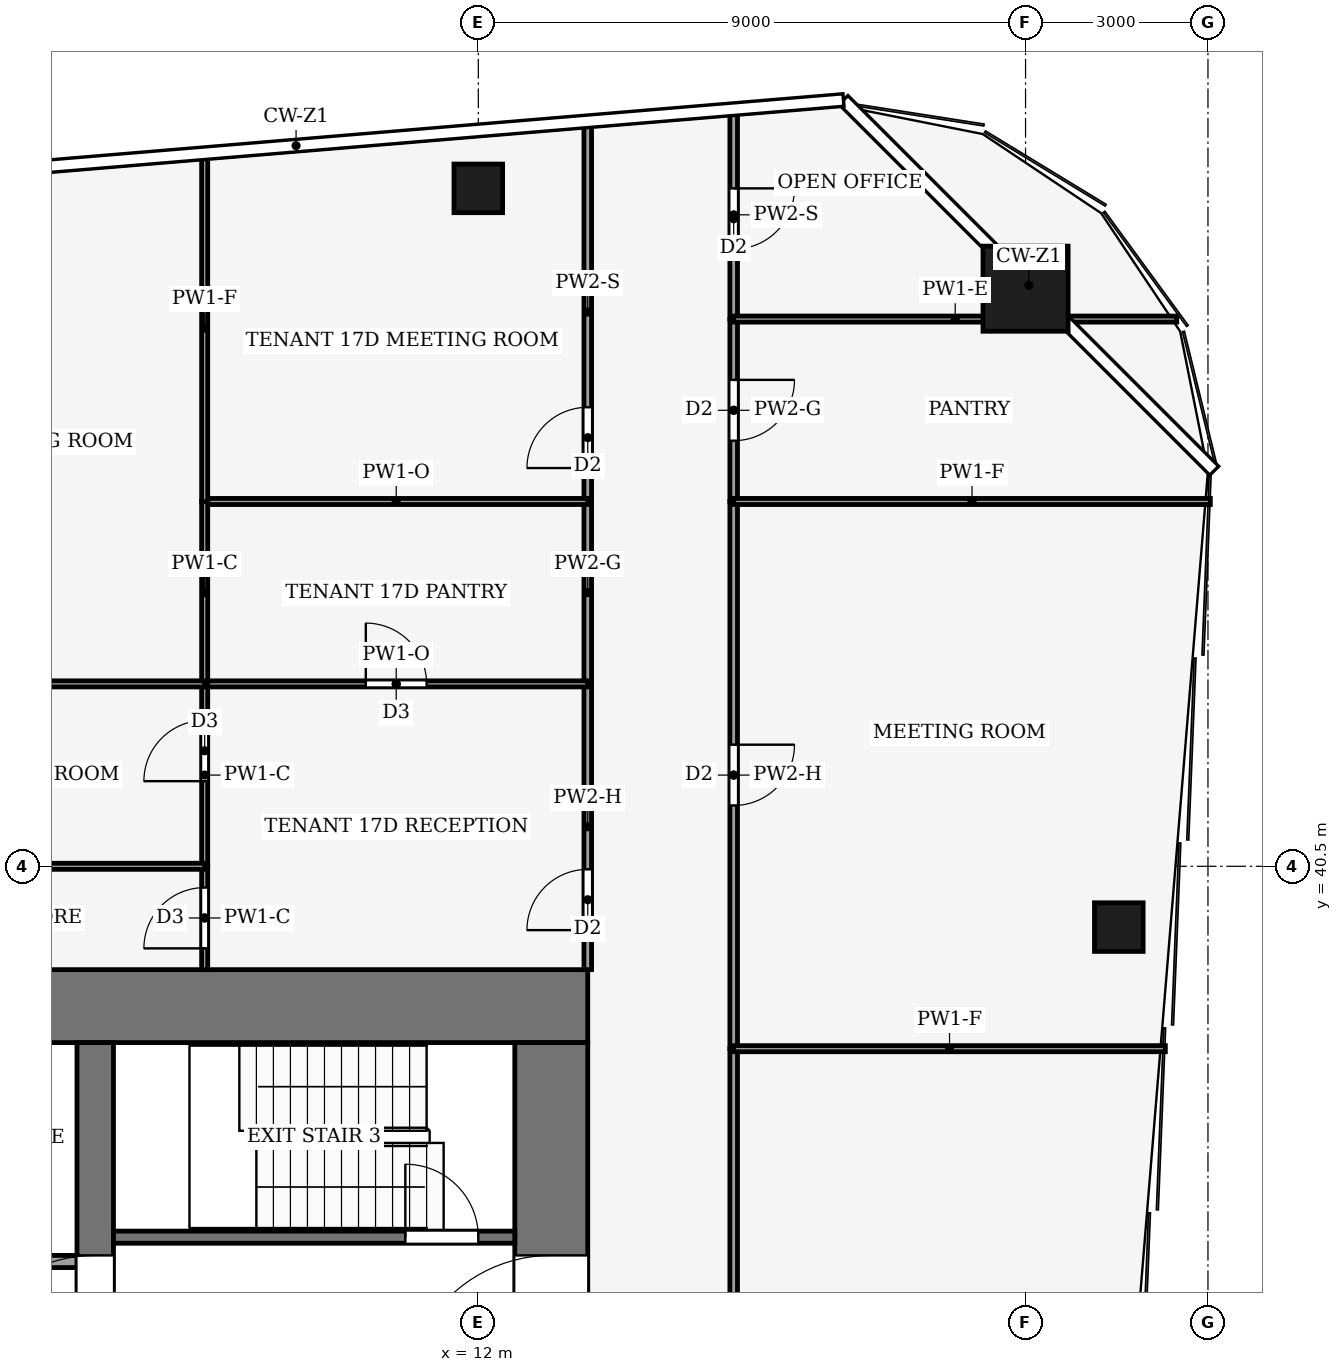
"""IFC4 building model, lengths in metres.
Left out: names, types, materials, properties, quantities, classifications, styles, units other than length and angle.
Written with IfcOpenShell. Run it as: python <this file> out.ifc"""

import sys

from ifc_helpers import new_model, si_unit, direction, frame, frame_2d, origin, origin_2d, place, context, subcontext, project, spatial, rectangle, hollow_rectangle, extrude, element, fill, save


model = new_model("IFC4")
c1 = context("Model", 3, precision=1e-05, world=origin(), true_north=direction((0.0, 1.0)))
c2 = subcontext(c1, "Body", "Model", "MODEL_VIEW")
j1 = project(units=[si_unit("LENGTHUNIT", "METRE"), si_unit("PLANEANGLEUNIT", "RADIAN")], contexts=[c1])
p1 = place(None, origin())
s1 = spatial("IfcSite", under=j1, at=p1, CompositionType="ELEMENT")
p2 = place(p1, origin())
s2 = spatial("IfcBuilding", under=s1, at=p2, CompositionType="ELEMENT")
p3 = place(p2, frame((0.0, 0.0, 78.0)))
s3 = spatial("IfcBuildingStorey", under=s2, at=p3, CompositionType="ELEMENT", Elevation=78.0)
p4 = place(p3, frame((-13.8, 38.2, -0.13), z_axis=(0.0, 0.0, 1.0), x_axis=(1.0, 0.0, 0.0)))
e1 = element("IfcWall", 1, at=p4, inside=s3, PredefinedType="SHEAR", context=c2, shape_type="SweptSolid", body=[
    extrude(rectangle(XDim=27.6, YDim=1.2, at=frame_2d((13.8, 0.0))), origin(), (0.0, 0.0, 1.0), 4.0),
])
p5 = place(p3, frame((13.2, 18.4, -0.13), z_axis=(0.0, 0.0, 1.0), x_axis=(0.0, 1.0, 0.0)))
e2 = element("IfcWall", 2, at=p5, inside=s3, PredefinedType="SHEAR", context=c2, shape_type="SweptSolid", body=[
    extrude(rectangle(XDim=19.2, YDim=1.2, at=frame_2d((9.6, 0.0))), origin(), (0.0, 0.0, 1.0), 4.0),
])
p6 = place(p5, frame((2.8, 0.0, 0.13)))
e3 = element("IfcOpeningElement", 3, at=p6, cuts=e2, PredefinedType="OPENING", context=c2, shape_type="SweptSolid", body=[
    extrude(rectangle(XDim=2.4, YDim=2.4, at=frame_2d((1.2, 1.2))), frame((0.0, 0.61, 0.0), z_axis=(0.0, -1.0, 0.0), x_axis=(1.0, 0.0, 0.0)), (0.0, 0.0, 1.0), 1.22),
])
p7 = place(p5, frame((13.3, 0.0, 0.13)))
e4 = element("IfcOpeningElement", 4, at=p7, cuts=e2, PredefinedType="OPENING", context=c2, shape_type="SweptSolid", body=[
    extrude(rectangle(XDim=2.4, YDim=2.4, at=frame_2d((1.2, 1.2))), frame((0.0, 0.61, 0.0), z_axis=(0.0, -1.0, 0.0), x_axis=(1.0, 0.0, 0.0)), (0.0, 0.0, 1.0), 1.22),
])
p8 = place(p3, frame((5.7, 18.4, -0.13), z_axis=(0.0, 0.0, 1.0), x_axis=(0.0, 1.0, 0.0)))
e5 = element("IfcWall", 5, at=p8, inside=s3, PredefinedType="SHEAR", context=c2, shape_type="SweptSolid", body=[
    extrude(rectangle(XDim=19.2, YDim=0.6, at=frame_2d((9.6, 0.0))), origin(), (0.0, 0.0, 1.0), 4.0),
])
p9 = place(p8, frame((8.35, 0.0, 0.13)))
e6 = element("IfcOpeningElement", 6, at=p9, cuts=e5, PredefinedType="OPENING", context=c2, shape_type="SweptSolid", body=[
    extrude(rectangle(XDim=0.9, YDim=2.1, at=frame_2d((0.45, 1.05))), frame((0.0, 0.31, 0.0), z_axis=(0.0, -1.0, 0.0), x_axis=(1.0, 0.0, 0.0)), (0.0, 0.0, 1.0), 0.62),
])
p10 = place(p8, frame((13.3, 0.0, 0.13)))
e7 = element("IfcOpeningElement", 7, at=p10, cuts=e5, PredefinedType="OPENING", context=c2, shape_type="SweptSolid", body=[
    extrude(rectangle(XDim=2.4, YDim=2.4, at=frame_2d((1.2, 1.2))), frame((0.0, 0.31, 0.0), z_axis=(0.0, -1.0, 0.0), x_axis=(1.0, 0.0, 0.0)), (0.0, 0.0, 1.0), 0.62),
])
p11 = place(p3, frame((21.0, 50.0, 0.0), z_axis=(0.0, 0.0, 1.0), x_axis=(1.0, 0.0, 0.0)))
e8 = element("IfcColumn", 8, at=p11, inside=s3, PredefinedType="COLUMN", context=c2, shape_type="SweptSolid", body=[
    extrude(hollow_rectangle(XDim=1.4, YDim=1.4, WallThickness=0.08, at=origin_2d()), origin(), (0.0, 0.0, 1.0), 4.0),
])
for number, where, z_axis, x_axis in (
    (9, (12.0, 51.65, 0.0), (0.0, 0.0, 1.0), (1.0, 0.0, 0.0)),
    (10, (22.534, 39.5, 0.0), (0.0, 0.0, 1.0), (1.0, 0.0, 0.0)),
):
    element("IfcColumn", number, at=place(p3, frame(where, z_axis=z_axis, x_axis=x_axis)), inside=s3, PredefinedType="COLUMN", context=c2, shape_type="SweptSolid", body=[
        extrude(hollow_rectangle(XDim=0.8, YDim=0.8, WallThickness=0.04, at=origin_2d()), origin(), (0.0, 0.0, 1.0), 4.0),
    ])
p12 = place(p3, frame((-5.4, 34.0, 0.0), z_axis=(0.0, 0.0, 1.0), x_axis=(1.0, 0.0, 0.0)))
e11 = element("IfcWall", 11, at=p12, inside=s3, PredefinedType="PARTITIONING", context=c2, shape_type="SweptSolid", body=[
    extrude(rectangle(XDim=10.8, YDim=0.2, at=frame_2d((5.4, 0.0))), origin(), (0.0, 0.0, 1.0), 3.87),
])
p13 = place(p12, frame((6.15, 0.0, 0.0)))
e12 = element("IfcOpeningElement", 12, at=p13, cuts=e11, PredefinedType="OPENING", context=c2, shape_type="SweptSolid", body=[
    extrude(rectangle(XDim=1.2, YDim=2.2, at=frame_2d((0.6, 1.1))), frame((0.0, 0.11, 0.0), z_axis=(0.0, -1.0, 0.0), x_axis=(1.0, 0.0, 0.0)), (0.0, 0.0, 1.0), 0.22),
])
p14 = place(p12, frame((8.95, 0.0, 0.0)))
e13 = element("IfcOpeningElement", 13, at=p14, cuts=e11, PredefinedType="OPENING", context=c2, shape_type="SweptSolid", body=[
    extrude(rectangle(XDim=1.0, YDim=2.1, at=frame_2d((0.5, 1.05))), frame((0.0, 0.11, 0.0), z_axis=(0.0, -1.0, 0.0), x_axis=(1.0, 0.0, 0.0)), (0.0, 0.0, 1.0), 0.22),
])
p15 = place(p3, frame((6.0, 34.4, 0.0), z_axis=(0.0, 0.0, 1.0), x_axis=(1.0, 0.0, 0.0)))
e14 = element("IfcWall", 14, at=p15, inside=s3, PredefinedType="PARTITIONING", context=c2, shape_type="SweptSolid", body=[
    extrude(rectangle(XDim=6.6, YDim=0.2, at=frame_2d((3.3, 0.0))), origin(), (0.0, 0.0, 1.0), 3.87),
])
p16 = place(p15, frame((4.8, 0.0, 0.0)))
e15 = element("IfcOpeningElement", 15, at=p16, cuts=e14, PredefinedType="OPENING", context=c2, shape_type="SweptSolid", body=[
    extrude(rectangle(XDim=1.2, YDim=2.2, at=frame_2d((0.6, 1.1))), frame((0.0, 0.11, 0.0), z_axis=(0.0, -1.0, 0.0), x_axis=(1.0, 0.0, 0.0)), (0.0, 0.0, 1.0), 0.22),
])
p17 = place(p3, frame((16.2, 37.5, 0.0), z_axis=(0.0, 0.0, 1.0), x_axis=(0.0, -1.0, 0.0)))
e16 = element("IfcWall", 16, at=p17, inside=s3, PredefinedType="PARTITIONING", context=c2, shape_type="SweptSolid", body=[
    extrude(rectangle(XDim=12.0, YDim=0.125, at=frame_2d((6.0, 0.0))), origin(), (0.0, 0.0, 1.0), 3.48),
])
p18 = place(p17, frame((5.5, 0.0, 0.0)))
e17 = element("IfcOpeningElement", 17, at=p18, cuts=e16, PredefinedType="OPENING", context=c2, shape_type="SweptSolid", body=[
    extrude(rectangle(XDim=1.0, YDim=2.1, at=frame_2d((0.5, 1.05))), frame((0.0, 0.073, 0.0), z_axis=(0.0, -1.0, 0.0), x_axis=(1.0, 0.0, 0.0)), (0.0, 0.0, 1.0), 0.145),
])
p19 = place(p3, frame((16.2, 46.5, 0.0), z_axis=(0.0, 0.0, 1.0), x_axis=(0.0, -1.0, 0.0)))
e18 = element("IfcWall", 18, at=p19, inside=s3, PredefinedType="PARTITIONING", context=c2, shape_type="SweptSolid", body=[
    extrude(rectangle(XDim=9.0, YDim=0.125, at=frame_2d((4.5, 0.0))), origin(), (0.0, 0.0, 1.0), 3.14),
])
p20 = place(p19, frame((4.0, 0.0, 0.0)))
e19 = element("IfcOpeningElement", 19, at=p20, cuts=e18, PredefinedType="OPENING", context=c2, shape_type="SweptSolid", body=[
    extrude(rectangle(XDim=1.0, YDim=2.1, at=frame_2d((0.5, 1.05))), frame((0.0, 0.073, 0.0), z_axis=(0.0, -1.0, 0.0), x_axis=(1.0, 0.0, 0.0)), (0.0, 0.0, 1.0), 0.145),
])
p21 = place(p3, frame((16.2, 49.5, 0.0), z_axis=(0.0, 0.0, 1.0), x_axis=(0.0, -1.0, 0.0)))
e20 = element("IfcWall", 20, at=p21, inside=s3, PredefinedType="PARTITIONING", context=c2, shape_type="SweptSolid", body=[
    extrude(rectangle(XDim=3.0, YDim=0.125, at=frame_2d((1.5, 0.0))), origin(), (0.0, 0.0, 1.0), 3.87),
])
p22 = place(p21, frame((1.0, 0.0, 0.0)))
e21 = element("IfcOpeningElement", 21, at=p22, cuts=e20, PredefinedType="OPENING", context=c2, shape_type="SweptSolid", body=[
    extrude(rectangle(XDim=1.0, YDim=2.1, at=frame_2d((0.5, 1.05))), frame((0.0, 0.073, 0.0), z_axis=(0.0, -1.0, 0.0), x_axis=(1.0, 0.0, 0.0)), (0.0, 0.0, 1.0), 0.145),
])
p23 = place(p3, frame((16.2, 52.93, 0.0), z_axis=(0.0, 0.0, 1.0), x_axis=(0.0, -1.0, 0.0)))
e22 = element("IfcWall", 22, at=p23, inside=s3, PredefinedType="PARTITIONING", context=c2, shape_type="SweptSolid", body=[
    extrude(rectangle(XDim=3.43, YDim=0.125, at=frame_2d((1.715, 0.0))), origin(), (0.0, 0.0, 1.0), 3.04),
])
p24 = place(p23, frame((1.28, 0.0, 0.0)))
e23 = element("IfcOpeningElement", 23, at=p24, cuts=e22, PredefinedType="OPENING", context=c2, shape_type="SweptSolid", body=[
    extrude(rectangle(XDim=1.0, YDim=2.1, at=frame_2d((0.5, 1.05))), frame((0.0, 0.073, 0.0), z_axis=(0.0, -1.0, 0.0), x_axis=(1.0, 0.0, 0.0)), (0.0, 0.0, 1.0), 0.145),
])
p25 = place(p3, frame((13.8, 38.8, 0.0), z_axis=(0.0, 0.0, 1.0), x_axis=(0.0, 1.0, 0.0)))
e24 = element("IfcWall", 24, at=p25, inside=s3, PredefinedType="PARTITIONING", context=c2, shape_type="SweptSolid", body=[
    extrude(rectangle(XDim=4.7, YDim=0.125, at=frame_2d((2.35, 0.0))), origin(), (0.0, 0.0, 1.0), 3.14),
])
p26 = place(p25, frame((0.65, 0.0, 0.0)))
e25 = element("IfcOpeningElement", 25, at=p26, cuts=e24, PredefinedType="OPENING", context=c2, shape_type="SweptSolid", body=[
    extrude(rectangle(XDim=1.0, YDim=2.1, at=frame_2d((0.5, 1.05))), frame((0.0, 0.073, 0.0), z_axis=(0.0, -1.0, 0.0), x_axis=(1.0, 0.0, 0.0)), (0.0, 0.0, 1.0), 0.145),
])
p27 = place(p3, frame((13.8, 46.5, 0.0), z_axis=(0.0, 0.0, 1.0), x_axis=(0.0, -1.0, 0.0)))
e26 = element("IfcWall", 26, at=p27, inside=s3, PredefinedType="PARTITIONING", context=c2, shape_type="SweptSolid", body=[
    extrude(rectangle(XDim=3.0, YDim=0.125, at=frame_2d((1.5, 0.0))), origin(), (0.0, 0.0, 1.0), 3.87),
])
p28 = place(p3, frame((13.8, 46.5, 0.0), z_axis=(0.0, 0.0, 1.0), x_axis=(0.0, 1.0, 0.0)))
e27 = element("IfcWall", 27, at=p28, inside=s3, PredefinedType="PARTITIONING", context=c2, shape_type="SweptSolid", body=[
    extrude(rectangle(XDim=6.23, YDim=0.125, at=frame_2d((3.115, 0.0))), origin(), (0.0, 0.0, 1.0), 3.04),
])
p29 = place(p28, frame((0.55, 0.0, 0.0)))
e28 = element("IfcOpeningElement", 28, at=p29, cuts=e27, PredefinedType="OPENING", context=c2, shape_type="SweptSolid", body=[
    extrude(rectangle(XDim=1.0, YDim=2.1, at=frame_2d((0.5, 1.05))), frame((0.0, 0.073, 0.0), z_axis=(0.0, -1.0, 0.0), x_axis=(1.0, 0.0, 0.0)), (0.0, 0.0, 1.0), 0.145),
])
p30 = place(p3, frame((23.299, 37.5, 0.0), z_axis=(0.0, 0.0, 1.0), x_axis=(-1.0, 0.0, 0.0)))
e29 = element("IfcWall", 29, at=p30, inside=s3, PredefinedType="PARTITIONING", context=c2, shape_type="SweptSolid", body=[
    extrude(rectangle(XDim=7.099, YDim=0.1, at=frame_2d((3.55, 0.0))), origin(), (0.0, 0.0, 1.0), 3.04),
])
p31 = place(p3, frame((24.039, 46.5, 0.0), z_axis=(0.0, 0.0, 1.0), x_axis=(-1.0, 0.0, 0.0)))
e30 = element("IfcWall", 30, at=p31, inside=s3, PredefinedType="PARTITIONING", context=c2, shape_type="SweptSolid", body=[
    extrude(rectangle(XDim=7.839, YDim=0.1, at=frame_2d((3.919, 0.0))), origin(), (0.0, 0.0, 1.0), 3.04),
])
p32 = place(p3, frame((23.487, 49.5, 0.0), z_axis=(0.0, 0.0, 1.0), x_axis=(-1.0, 0.0, 0.0)))
e31 = element("IfcWall", 31, at=p32, inside=s3, PredefinedType="PARTITIONING", context=c2, shape_type="SweptSolid", body=[
    extrude(rectangle(XDim=7.287, YDim=0.1, at=frame_2d((3.644, 0.0))), origin(), (0.0, 0.0, 1.0), 3.34),
])
p33 = place(p3, frame((7.5, 43.5, 0.0), z_axis=(0.0, 0.0, 1.0), x_axis=(1.0, 0.0, 0.0)))
e32 = element("IfcWall", 32, at=p33, inside=s3, PredefinedType="PARTITIONING", context=c2, shape_type="SweptSolid", body=[
    extrude(rectangle(XDim=6.3, YDim=0.1, at=frame_2d((3.15, 0.0))), origin(), (0.0, 0.0, 1.0), 3.39),
])
p34 = place(p33, frame((2.65, 0.0, 0.0)))
e33 = element("IfcOpeningElement", 33, at=p34, cuts=e32, PredefinedType="OPENING", context=c2, shape_type="SweptSolid", body=[
    extrude(rectangle(XDim=1.0, YDim=2.1, at=frame_2d((0.5, 1.05))), frame((0.0, 0.06, 0.0), z_axis=(0.0, -1.0, 0.0), x_axis=(1.0, 0.0, 0.0)), (0.0, 0.0, 1.0), 0.12),
])
p35 = place(p3, frame((7.5, 38.8, 0.0), z_axis=(0.0, 0.0, 1.0), x_axis=(0.0, 1.0, 0.0)))
e34 = element("IfcWall", 34, at=p35, inside=s3, PredefinedType="PARTITIONING", context=c2, shape_type="SweptSolid", body=[
    extrude(rectangle(XDim=1.7, YDim=0.1, at=frame_2d((0.85, 0.0))), origin(), (0.0, 0.0, 1.0), 3.87),
])
p36 = place(p35, frame((0.35, 0.0, 0.0)))
e35 = element("IfcOpeningElement", 35, at=p36, cuts=e34, PredefinedType="OPENING", context=c2, shape_type="SweptSolid", body=[
    extrude(rectangle(XDim=1.0, YDim=2.1, at=frame_2d((0.5, 1.05))), frame((0.0, 0.06, 0.0), z_axis=(0.0, -1.0, 0.0), x_axis=(1.0, 0.0, 0.0)), (0.0, 0.0, 1.0), 0.12),
])
p37 = place(p3, frame((7.5, 40.5, 0.0), z_axis=(0.0, 0.0, 1.0), x_axis=(0.0, 1.0, 0.0)))
e36 = element("IfcWall", 36, at=p37, inside=s3, PredefinedType="PARTITIONING", context=c2, shape_type="SweptSolid", body=[
    extrude(rectangle(XDim=3.0, YDim=0.1, at=frame_2d((1.5, 0.0))), origin(), (0.0, 0.0, 1.0), 3.87),
])
p38 = place(p37, frame((1.4, 0.0, 0.0)))
e37 = element("IfcOpeningElement", 37, at=p38, cuts=e36, PredefinedType="OPENING", context=c2, shape_type="SweptSolid", body=[
    extrude(rectangle(XDim=1.0, YDim=2.1, at=frame_2d((0.5, 1.05))), frame((0.0, 0.06, 0.0), z_axis=(0.0, -1.0, 0.0), x_axis=(1.0, 0.0, 0.0)), (0.0, 0.0, 1.0), 0.12),
])
p39 = place(p3, frame((13.8, 46.5, 0.0), z_axis=(0.0, 0.0, 1.0), x_axis=(-1.0, 0.0, 0.0)))
e38 = element("IfcWall", 38, at=p39, inside=s3, PredefinedType="PARTITIONING", context=c2, shape_type="SweptSolid", body=[
    extrude(rectangle(XDim=6.3, YDim=0.1, at=frame_2d((3.15, 0.0))), origin(), (0.0, 0.0, 1.0), 3.39),
])
p40 = place(p3, frame((7.5, 46.504, 0.0), z_axis=(0.0, 0.0, 1.0), x_axis=(0.0, -1.0, 0.0)))
e39 = element("IfcWall", 39, at=p40, inside=s3, PredefinedType="PARTITIONING", context=c2, shape_type="SweptSolid", body=[
    extrude(rectangle(XDim=3.004, YDim=0.1, at=frame_2d((1.502, 0.0))), origin(), (0.0, 0.0, 1.0), 3.87),
])
p41 = place(p3, frame((7.5, 52.205, 0.0), z_axis=(0.0, 0.0, 1.0), x_axis=(0.0, -1.0, 0.0)))
e40 = element("IfcWall", 40, at=p41, inside=s3, PredefinedType="PARTITIONING", context=c2, shape_type="SweptSolid", body=[
    extrude(rectangle(XDim=5.709, YDim=0.1, at=frame_2d((2.854, 0.0))), origin(), (0.0, 0.0, 1.0), 3.04),
])
p42 = place(p3, frame((7.5, 40.5, 0.0), z_axis=(0.0, 0.0, 1.0), x_axis=(-1.0, 0.0, 0.0)))
e41 = element("IfcWall", 41, at=p42, inside=s3, PredefinedType="PARTITIONING", context=c2, shape_type="SweptSolid", body=[
    extrude(rectangle(XDim=7.5, YDim=0.1, at=frame_2d((3.75, 0.0))), origin(), (0.0, 0.0, 1.0), 3.39),
])
p43 = place(p3, frame((0.0, 43.5, 0.0), z_axis=(0.0, 0.0, 1.0), x_axis=(1.0, 0.0, 0.0)))
e42 = element("IfcWall", 42, at=p43, inside=s3, PredefinedType="PARTITIONING", context=c2, shape_type="SweptSolid", body=[
    extrude(rectangle(XDim=7.5, YDim=0.1, at=frame_2d((3.75, 0.0))), origin(), (0.0, 0.0, 1.0), 3.39),
])
p44 = place(p43, frame((3.25, 0.0, 0.0)))
e43 = element("IfcOpeningElement", 43, at=p44, cuts=e42, PredefinedType="OPENING", context=c2, shape_type="SweptSolid", body=[
    extrude(rectangle(XDim=1.0, YDim=2.1, at=frame_2d((0.5, 1.05))), frame((0.0, 0.06, 0.0), z_axis=(0.0, -1.0, 0.0), x_axis=(1.0, 0.0, 0.0)), (0.0, 0.0, 1.0), 0.12),
])
p45 = place(p16, origin())
e44 = element("IfcDoor", 44, at=p45, inside=s3, OperationType="SINGLE_SWING_RIGHT", PredefinedType="DOOR", context=c2, shape_type="SweptSolid", body=[
    extrude(rectangle(XDim=1.2, YDim=2.2, at=frame_2d((0.6, 1.1))), frame((0.0, 0.025, 0.0), z_axis=(0.0, -1.0, 0.0), x_axis=(1.0, 0.0, 0.0)), (0.0, 0.0, 1.0), 0.05),
])
fill(e15, e44)
p46 = place(p10, origin())
e45 = element("IfcDoor", 45, at=p46, inside=s3, OperationType="DOUBLE_DOOR_SINGLE_SWING", PredefinedType="DOOR", context=c2, shape_type="SweptSolid", body=[
    extrude(rectangle(XDim=2.4, YDim=2.4, at=frame_2d((1.2, 1.2))), frame((0.0, 0.025, 0.0), z_axis=(0.0, -1.0, 0.0), x_axis=(1.0, 0.0, 0.0)), (0.0, 0.0, 1.0), 0.05),
])
fill(e7, e45)
p47 = place(p7, origin())
e46 = element("IfcDoor", 46, at=p47, inside=s3, OperationType="DOUBLE_DOOR_SINGLE_SWING", PredefinedType="DOOR", context=c2, shape_type="SweptSolid", body=[
    extrude(rectangle(XDim=2.4, YDim=2.4, at=frame_2d((1.2, 1.2))), frame((0.0, 0.025, 0.0), z_axis=(0.0, -1.0, 0.0), x_axis=(1.0, 0.0, 0.0)), (0.0, 0.0, 1.0), 0.05),
])
fill(e4, e46)
p48 = place(p20, origin())
e47 = element("IfcDoor", 47, at=p48, inside=s3, OperationType="SINGLE_SWING_RIGHT", PredefinedType="DOOR", context=c2, shape_type="SweptSolid", body=[
    extrude(rectangle(XDim=1.0, YDim=2.1, at=frame_2d((0.5, 1.05))), frame((0.0, 0.025, 0.0), z_axis=(0.0, -1.0, 0.0), x_axis=(1.0, 0.0, 0.0)), (0.0, 0.0, 1.0), 0.05),
])
fill(e19, e47)
p49 = place(p22, origin())
e48 = element("IfcDoor", 48, at=p49, inside=s3, OperationType="SINGLE_SWING_LEFT", PredefinedType="DOOR", context=c2, shape_type="SweptSolid", body=[
    extrude(rectangle(XDim=1.0, YDim=2.1, at=frame_2d((0.5, 1.05))), frame((0.0, 0.025, 0.0), z_axis=(0.0, -1.0, 0.0), x_axis=(1.0, 0.0, 0.0)), (0.0, 0.0, 1.0), 0.05),
])
fill(e21, e48)
p50 = place(p24, origin())
e49 = element("IfcDoor", 49, at=p50, inside=s3, OperationType="SINGLE_SWING_RIGHT", PredefinedType="DOOR", context=c2, shape_type="SweptSolid", body=[
    extrude(rectangle(XDim=1.0, YDim=2.1, at=frame_2d((0.5, 1.05))), frame((0.0, 0.025, 0.0), z_axis=(0.0, -1.0, 0.0), x_axis=(1.0, 0.0, 0.0)), (0.0, 0.0, 1.0), 0.05),
])
fill(e23, e49)
p51 = place(p26, origin())
e50 = element("IfcDoor", 50, at=p51, inside=s3, OperationType="SINGLE_SWING_LEFT", PredefinedType="DOOR", context=c2, shape_type="SweptSolid", body=[
    extrude(rectangle(XDim=1.0, YDim=2.1, at=frame_2d((0.5, 1.05))), frame((0.0, 0.025, 0.0), z_axis=(0.0, -1.0, 0.0), x_axis=(1.0, 0.0, 0.0)), (0.0, 0.0, 1.0), 0.05),
])
fill(e25, e50)
p52 = place(p29, origin())
e51 = element("IfcDoor", 51, at=p52, inside=s3, OperationType="SINGLE_SWING_LEFT", PredefinedType="DOOR", context=c2, shape_type="SweptSolid", body=[
    extrude(rectangle(XDim=1.0, YDim=2.1, at=frame_2d((0.5, 1.05))), frame((0.0, 0.025, 0.0), z_axis=(0.0, -1.0, 0.0), x_axis=(1.0, 0.0, 0.0)), (0.0, 0.0, 1.0), 0.05),
])
fill(e28, e51)
p53 = place(p34, origin())
e52 = element("IfcDoor", 52, at=p53, inside=s3, OperationType="SINGLE_SWING_RIGHT", PredefinedType="DOOR", context=c2, shape_type="SweptSolid", body=[
    extrude(rectangle(XDim=1.0, YDim=2.1, at=frame_2d((0.5, 1.05))), frame((0.0, 0.025, 0.0), z_axis=(0.0, -1.0, 0.0), x_axis=(1.0, 0.0, 0.0)), (0.0, 0.0, 1.0), 0.05),
])
fill(e33, e52)
p54 = place(p36, origin())
e53 = element("IfcDoor", 53, at=p54, inside=s3, OperationType="SINGLE_SWING_LEFT", PredefinedType="DOOR", context=c2, shape_type="SweptSolid", body=[
    extrude(rectangle(XDim=1.0, YDim=2.1, at=frame_2d((0.5, 1.05))), frame((0.0, 0.025, 0.0), z_axis=(0.0, -1.0, 0.0), x_axis=(1.0, 0.0, 0.0)), (0.0, 0.0, 1.0), 0.05),
])
fill(e35, e53)
p55 = place(p38, origin())
e54 = element("IfcDoor", 54, at=p55, inside=s3, OperationType="SINGLE_SWING_RIGHT", PredefinedType="DOOR", context=c2, shape_type="SweptSolid", body=[
    extrude(rectangle(XDim=1.0, YDim=2.1, at=frame_2d((0.5, 1.05))), frame((0.0, 0.025, 0.0), z_axis=(0.0, -1.0, 0.0), x_axis=(1.0, 0.0, 0.0)), (0.0, 0.0, 1.0), 0.05),
])
fill(e37, e54)
save(model, sys.argv[1])
